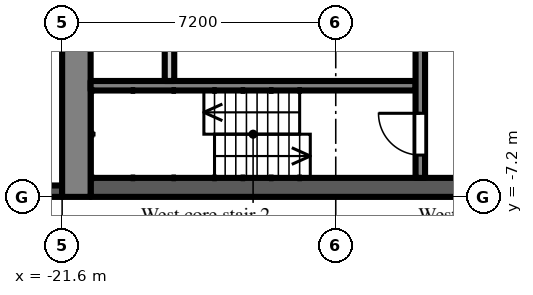
"""IFC4 building model, lengths in metres.
Left out: names, types, materials, properties, quantities, classifications, styles, units other than length and angle.
Written with IfcOpenShell. Run it as: python <this file> out.ifc"""

import sys

from ifc_helpers import new_model, si_unit, direction, frame, frame_2d, origin, place, context, subcontext, project, spatial, rectangle, extrude, element, fill, save


model = new_model("IFC4")
c1 = context("Model", 3, precision=1e-05, world=origin(), true_north=direction((0.0, 1.0)))
c2 = subcontext(c1, "Body", "Model", "MODEL_VIEW")
j1 = project(units=[si_unit("LENGTHUNIT", "METRE"), si_unit("PLANEANGLEUNIT", "RADIAN")], contexts=[c1])
p1 = place(None, origin())
s1 = spatial("IfcSite", under=j1, at=p1, CompositionType="ELEMENT")
p2 = place(p1, origin())
s2 = spatial("IfcBuilding", under=s1, at=p2, CompositionType="ELEMENT")
p3 = place(p2, frame((0.0, 0.0, 84.9)))
s3 = spatial("IfcBuildingStorey", under=s2, at=p3, CompositionType="ELEMENT", Elevation=84.9)
p4 = place(p3, frame((-24.3, -7.05, 0.0), z_axis=(0.0, 0.0, 1.0), x_axis=(1.0, 0.0, 0.0)))
e1 = element("IfcWall", 1, at=p4, inside=s3, PredefinedType="SOLIDWALL", context=c2, shape_type="SweptSolid", body=[
    extrude(rectangle(XDim=2.7, YDim=0.3, at=frame_2d((1.35, 0.0))), origin(), (0.0, 0.0, 1.0), 2.1),
])
p5 = place(p4, frame((0.75, 0.0, 0.2)))
e2 = element("IfcOpeningElement", 2, at=p5, cuts=e1, PredefinedType="OPENING", context=c2, shape_type="SweptSolid", body=[
    extrude(rectangle(XDim=1.2, YDim=1.85, at=frame_2d((0.6, 0.925))), frame((0.0, 0.16, 0.0), z_axis=(0.0, -1.0, 0.0), x_axis=(1.0, 0.0, 0.0)), (0.0, 0.0, 1.0), 0.32),
])
p6 = place(p3, frame((-21.225, -7.2, 0.0), z_axis=(0.0, 0.0, 1.0), x_axis=(0.0, 1.0, 0.0)))
e3 = element("IfcWall", 3, at=p6, inside=s3, PredefinedType="SHEAR", context=c2, shape_type="SweptSolid", body=[
    extrude(rectangle(XDim=14.4, YDim=0.75, at=frame_2d((7.2, 0.0))), origin(), (0.0, 0.0, 1.0), 2.575),
])
p7 = place(p6, frame((6.0, 0.0, 0.0)))
e4 = element("IfcOpeningElement", 4, at=p7, cuts=e3, PredefinedType="OPENING", context=c2, shape_type="SweptSolid", body=[
    extrude(rectangle(XDim=2.4, YDim=2.2, at=frame_2d((1.2, 1.1))), frame((0.0, 0.385, 0.0), z_axis=(0.0, -1.0, 0.0), x_axis=(1.0, 0.0, 0.0)), (0.0, 0.0, 1.0), 0.77),
])
p8 = place(p3, frame((-7.9, -6.95, 0.0), z_axis=(0.0, 0.0, 1.0), x_axis=(-1.0, 0.0, 0.0)))
e5 = element("IfcWall", 5, at=p8, inside=s3, PredefinedType="SHEAR", context=c2, shape_type="SweptSolid", body=[
    extrude(rectangle(XDim=12.95, YDim=0.5, at=frame_2d((6.475, 0.0))), origin(), (0.0, 0.0, 1.0), 2.575),
])
p9 = place(p3, frame((-12.3, -4.275, 0.0), z_axis=(0.0, 0.0, 1.0), x_axis=(-1.0, 0.0, 0.0)))
e6 = element("IfcWall", 6, at=p9, inside=s3, PredefinedType="SHEAR", context=c2, shape_type="SweptSolid", body=[
    extrude(rectangle(XDim=8.55, YDim=0.25, at=frame_2d((4.275, 0.0))), origin(), (0.0, 0.0, 1.0), 2.575),
])
p10 = place(p3, frame((-12.175, -2.05, 0.0), z_axis=(0.0, 0.0, 1.0), x_axis=(0.0, -1.0, 0.0)))
e7 = element("IfcWall", 7, at=p10, inside=s3, PredefinedType="SHEAR", context=c2, shape_type="SweptSolid", body=[
    extrude(rectangle(XDim=4.65, YDim=0.25, at=frame_2d((2.325, 0.0))), origin(), (0.0, 0.0, 1.0), 2.575),
])
p11 = place(p10, frame((2.95, 0.0, 0.0)))
e8 = element("IfcOpeningElement", 8, at=p11, cuts=e7, PredefinedType="OPENING", context=c2, shape_type="SweptSolid", body=[
    extrude(rectangle(XDim=1.1, YDim=2.1, at=frame_2d((0.55, 1.05))), frame((0.0, 0.135, 0.0), z_axis=(0.0, -1.0, 0.0), x_axis=(1.0, 0.0, 0.0)), (0.0, 0.0, 1.0), 0.27),
])
p12 = place(p3, frame((-18.775, -2.05, 0.0), z_axis=(0.0, 0.0, 1.0), x_axis=(0.0, -1.0, 0.0)))
e9 = element("IfcWall", 9, at=p12, inside=s3, PredefinedType="PARTITIONING", context=c2, shape_type="SweptSolid", body=[
    extrude(rectangle(XDim=2.1, YDim=0.25, at=frame_2d((1.05, 0.0))), origin(), (0.0, 0.0, 1.0), 2.575),
])
p13 = place(p11, frame((1.1, 0.0, 0.0), z_axis=(0.0, 0.0, 1.0), x_axis=(-1.0, 0.0, 0.0)))
e10 = element("IfcDoor", 10, at=p13, inside=s3, OperationType="SINGLE_SWING_RIGHT", PredefinedType="DOOR", context=c2, shape_type="SweptSolid", body=[
    extrude(rectangle(XDim=1.1, YDim=2.1, at=frame_2d((0.55, 1.05))), frame((0.0, 0.025, 0.0), z_axis=(0.0, -1.0, 0.0), x_axis=(1.0, 0.0, 0.0)), (0.0, 0.0, 1.0), 0.05),
])
fill(e8, e10)
save(model, sys.argv[1])
